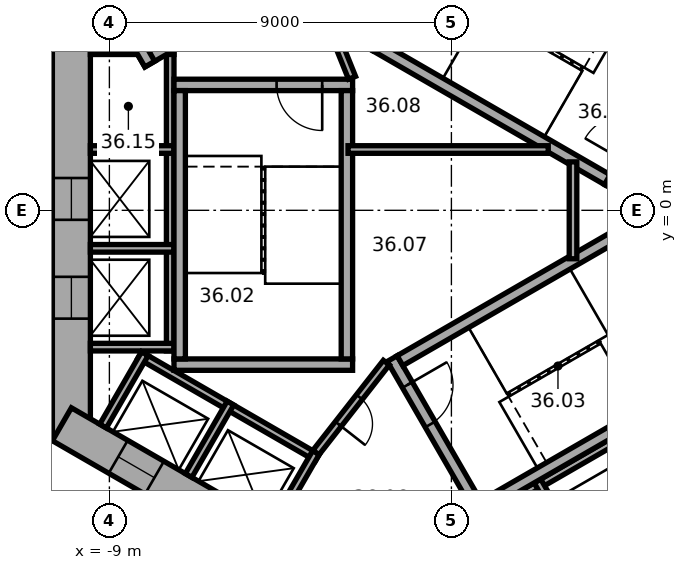
"""IFC4 building model, lengths in metres.
Left out: names, types, materials, properties, quantities, classifications, styles, units other than length and angle.
Written with IfcOpenShell. Run it as: python <this file> out.ifc"""

import sys

from ifc_helpers import new_model, si_unit, direction, frame, frame_2d, origin, place, context, subcontext, project, spatial, rectangle, extrude, element, fill, save


model = new_model("IFC4")
c1 = context("Model", 3, precision=1e-05, world=origin(), true_north=direction((0.0, 1.0)))
c2 = subcontext(c1, "Body", "Model", "MODEL_VIEW")
j1 = project(units=[si_unit("LENGTHUNIT", "METRE"), si_unit("PLANEANGLEUNIT", "RADIAN")], contexts=[c1])
p1 = place(None, origin())
s1 = spatial("IfcSite", under=j1, at=p1, CompositionType="ELEMENT")
p2 = place(p1, origin())
s2 = spatial("IfcBuilding", under=s1, at=p2, CompositionType="ELEMENT")
p3 = place(p2, frame((0.0, 0.0, 150.3)))
s3 = spatial("IfcBuildingStorey", under=s2, at=p3, CompositionType="ELEMENT", Elevation=150.3)
p4 = place(p3, frame((-10.0, 6.062, 0.0), z_axis=(0.0, 0.0, 1.0), x_axis=(0.0, -1.0, 0.0)))
e1 = element("IfcWall", 1, at=p4, inside=s3, PredefinedType="SHEAR", context=c2, shape_type="SweptSolid", body=[
    extrude(rectangle(XDim=12.125, YDim=1.0, at=frame_2d((6.062, 0.0))), origin(), (0.0, 0.0, 1.0), 3.7),
])
p5 = place(p4, frame((5.212, 0.0, 0.0)))
e2 = element("IfcOpeningElement", 2, at=p5, cuts=e1, PredefinedType="OPENING", context=c2, shape_type="SweptSolid", body=[
    extrude(rectangle(XDim=1.1, YDim=2.1, at=frame_2d((0.55, 1.05))), frame((0.0, 0.51, 0.0), z_axis=(0.0, -1.0, 0.0), x_axis=(1.0, 0.0, 0.0)), (0.0, 0.0, 1.0), 1.02),
])
p6 = place(p4, frame((7.812, 0.0, 0.0)))
e3 = element("IfcOpeningElement", 3, at=p6, cuts=e1, PredefinedType="OPENING", context=c2, shape_type="SweptSolid", body=[
    extrude(rectangle(XDim=1.1, YDim=2.1, at=frame_2d((0.55, 1.05))), frame((0.0, 0.51, 0.0), z_axis=(0.0, -1.0, 0.0), x_axis=(1.0, 0.0, 0.0)), (0.0, 0.0, 1.0), 1.02),
])
p7 = place(p3, frame((-10.25, -5.629, 0.0), z_axis=(0.0, 0.0, 1.0), x_axis=(0.866022616891, -0.50000482701, 0.0)))
e4 = element("IfcWall", 4, at=p7, inside=s3, PredefinedType="SHEAR", context=c2, shape_type="SweptSolid", body=[
    extrude(rectangle(XDim=12.125, YDim=1.0, at=frame_2d((6.062, 0.0))), origin(), (0.0, 0.0, 1.0), 3.7),
])
p8 = place(p7, frame((6.262, 0.0, 0.0)))
e5 = element("IfcOpeningElement", 5, at=p8, cuts=e4, PredefinedType="OPENING", context=c2, shape_type="SweptSolid", body=[
    extrude(rectangle(XDim=1.5, YDim=2.1, at=frame_2d((0.75, 1.05))), frame((0.0, 0.51, 0.0), z_axis=(0.0, -1.0, 0.0), x_axis=(1.0, 0.0, 0.0)), (0.0, 0.0, 1.0), 1.02),
])
p9 = place(p7, frame((1.712, 0.0, 0.0)))
e6 = element("IfcOpeningElement", 6, at=p9, cuts=e4, PredefinedType="OPENING", context=c2, shape_type="SweptSolid", body=[
    extrude(rectangle(XDim=1.1, YDim=2.1, at=frame_2d((0.55, 1.05))), frame((0.0, 0.51, 0.0), z_axis=(0.0, -1.0, 0.0), x_axis=(1.0, 0.0, 0.0)), (0.0, 0.0, 1.0), 1.02),
])
p10 = place(p7, frame((4.312, 0.0, 0.0)))
e7 = element("IfcOpeningElement", 7, at=p10, cuts=e4, PredefinedType="OPENING", context=c2, shape_type="SweptSolid", body=[
    extrude(rectangle(XDim=1.1, YDim=2.1, at=frame_2d((0.55, 1.05))), frame((0.0, 0.51, 0.0), z_axis=(0.0, -1.0, 0.0), x_axis=(1.0, 0.0, 0.0)), (0.0, 0.0, 1.0), 1.02),
])
p11 = place(p3, frame((-0.25, -11.691, 0.0), z_axis=(0.0, 0.0, 1.0), x_axis=(0.866022616891, 0.50000482701, 0.0)))
e8 = element("IfcWall", 8, at=p11, inside=s3, PredefinedType="SHEAR", context=c2, shape_type="SweptSolid", body=[
    extrude(rectangle(XDim=12.125, YDim=1.0, at=frame_2d((6.062, 0.0))), origin(), (0.0, 0.0, 1.0), 3.7),
])
p12 = place(p11, frame((2.612, 0.0, 0.0)))
e9 = element("IfcOpeningElement", 9, at=p12, cuts=e8, PredefinedType="OPENING", context=c2, shape_type="SweptSolid", body=[
    extrude(rectangle(XDim=1.1, YDim=2.1, at=frame_2d((0.55, 1.05))), frame((0.0, 0.51, 0.0), z_axis=(0.0, -1.0, 0.0), x_axis=(1.0, 0.0, 0.0)), (0.0, 0.0, 1.0), 1.02),
])
p13 = place(p11, frame((5.212, 0.0, 0.0)))
e10 = element("IfcOpeningElement", 10, at=p13, cuts=e8, PredefinedType="OPENING", context=c2, shape_type="SweptSolid", body=[
    extrude(rectangle(XDim=1.1, YDim=2.1, at=frame_2d((0.55, 1.05))), frame((0.0, 0.51, 0.0), z_axis=(0.0, -1.0, 0.0), x_axis=(1.0, 0.0, 0.0)), (0.0, 0.0, 1.0), 1.02),
])
p14 = place(p11, frame((7.812, 0.0, 0.0)))
e11 = element("IfcOpeningElement", 11, at=p14, cuts=e8, PredefinedType="OPENING", context=c2, shape_type="SweptSolid", body=[
    extrude(rectangle(XDim=1.1, YDim=2.1, at=frame_2d((0.55, 1.05))), frame((0.0, 0.51, 0.0), z_axis=(0.0, -1.0, 0.0), x_axis=(1.0, 0.0, 0.0)), (0.0, 0.0, 1.0), 1.02),
])
p15 = place(p3, frame((-7.4, 4.3, 0.0), z_axis=(0.0, 0.0, 1.0), x_axis=(0.0, -1.0, 0.0)))
e12 = element("IfcWall", 12, at=p15, inside=s3, PredefinedType="PARTITIONING", context=c2, shape_type="SweptSolid", body=[
    extrude(rectangle(XDim=8.0, YDim=0.2, at=frame_2d((4.0, 0.0))), origin(), (0.0, 0.0, 1.0), 3.42),
])
for number, where, z_axis, x_axis in (
    (13, (-7.3, 4.2, 0.0), (0.0, 0.0, 1.0), (-1.0, 0.0, 0.0)),
    (14, (-7.3, 1.6, 0.0), (0.0, 0.0, 1.0), (-1.0, 0.0, 0.0)),
    (15, (-7.3, -1.0, 0.0), (0.0, 0.0, 1.0), (-1.0, 0.0, 0.0)),
    (16, (-7.3, -3.6, 0.0), (0.0, 0.0, 1.0), (-1.0, 0.0, 0.0)),
):
    element("IfcWall", number, at=place(p3, frame(where, z_axis=z_axis, x_axis=x_axis)), inside=s3, PredefinedType="PARTITIONING", context=c2, shape_type="SweptSolid", body=[
        extrude(rectangle(XDim=2.2, YDim=0.2, at=frame_2d((1.1, 0.0))), origin(), (0.0, 0.0, 1.0), 3.42),
    ])
p16 = place(p3, frame((-8.203, -3.809, 0.0), z_axis=(0.0, 0.0, 1.0), x_axis=(0.866028230842, -0.499995103361, 0.0)))
e17 = element("IfcWall", 17, at=p16, inside=s3, PredefinedType="PARTITIONING", context=c2, shape_type="SweptSolid", body=[
    extrude(rectangle(XDim=5.4, YDim=0.2, at=frame_2d((2.7, 0.0))), origin(), (0.0, 0.0, 1.0), 3.42),
])
for number, where, z_axis, x_axis in (
    (18, (-8.067, -3.772, 0.0), (0.0, 0.0, 1.0), (-0.5, -0.866, 0.0)),
    (19, (-5.815, -5.072, 0.0), (0.0, 0.0, 1.0), (-0.5, -0.866, 0.0)),
):
    element("IfcWall", number, at=place(p3, frame(where, z_axis=z_axis, x_axis=x_axis)), inside=s3, PredefinedType="PARTITIONING", context=c2, shape_type="SweptSolid", body=[
        extrude(rectangle(XDim=2.2, YDim=0.2, at=frame_2d((1.1, 0.0))), origin(), (0.0, 0.0, 1.0), 3.42),
    ])
p17 = place(p3, frame((-3.563, -6.372, 0.0), z_axis=(0.0, 0.0, 1.0), x_axis=(-0.499994660107, -0.866028486751, 0.0)))
e20 = element("IfcWall", 20, at=p17, inside=s3, PredefinedType="PARTITIONING", context=c2, shape_type="SweptSolid", body=[
    extrude(rectangle(XDim=2.2, YDim=0.2, at=frame_2d((1.1, 0.0))), origin(), (0.0, 0.0, 1.0), 3.42),
])
p18 = place(p3, frame((-0.024, -8.559, 0.0), z_axis=(0.0, 0.0, 1.0), x_axis=(0.866026010844, 0.49999894854, 0.0)))
e21 = element("IfcWall", 21, at=p18, inside=s3, PredefinedType="PARTITIONING", context=c2, shape_type="SweptSolid", body=[
    extrude(rectangle(XDim=8.0, YDim=0.2, at=frame_2d((4.0, 0.0))), origin(), (0.0, 0.0, 1.0), 3.42),
])
p19 = place(p3, frame((2.264, -7.122, 0.0), z_axis=(0.0, 0.0, 1.0), x_axis=(0.500077893725, -0.86598042715, 0.0)))
e22 = element("IfcWall", 22, at=p19, inside=s3, PredefinedType="PARTITIONING", context=c2, shape_type="SweptSolid", body=[
    extrude(rectangle(XDim=2.2, YDim=0.2, at=frame_2d((1.1, 0.0))), origin(), (0.0, 0.0, 1.0), 3.42),
])
p20 = place(p3, frame((4.158, 0.602, 0.0), z_axis=(0.0, 0.0, 1.0), x_axis=(0.499977259774, 0.866038532462, 0.0)))
e23 = element("IfcWall", 23, at=p20, inside=s3, PredefinedType="SHEAR", context=c2, shape_type="SweptSolid", body=[
    extrude(rectangle(XDim=4.7, YDim=0.3, at=frame_2d((2.35, 0.0))), origin(), (0.0, 0.0, 1.0), 3.42),
])
p21 = place(p20, frame((0.8, 0.0, 0.0)))
e24 = element("IfcOpeningElement", 24, at=p21, cuts=e23, PredefinedType="OPENING", context=c2, shape_type="SweptSolid", body=[
    extrude(rectangle(XDim=1.2, YDim=2.1, at=frame_2d((0.6, 1.05))), frame((0.0, 0.16, 0.0), z_axis=(0.0, -1.0, 0.0), x_axis=(1.0, 0.0, 0.0)), (0.0, 0.0, 1.0), 0.32),
])
p22 = place(p3, frame((4.103, 0.807, 0.0), z_axis=(0.0, 0.0, 1.0), x_axis=(-0.866027801685, 0.499995846692, 0.0)))
e25 = element("IfcWall", 25, at=p22, inside=s3, PredefinedType="SHEAR", context=c2, shape_type="SweptSolid", body=[
    extrude(rectangle(XDim=7.06, YDim=0.3, at=frame_2d((3.53, 0.0))), origin(), (0.0, 0.0, 1.0), 3.42),
])
p23 = place(p3, frame((-2.6, 3.3, 0.0), z_axis=(0.0, 0.0, 1.0), x_axis=(-1.0, 0.0, 0.0)))
e26 = element("IfcWall", 26, at=p23, inside=s3, PredefinedType="SHEAR", context=c2, shape_type="SweptSolid", body=[
    extrude(rectangle(XDim=4.7, YDim=0.3, at=frame_2d((2.35, 0.0))), origin(), (0.0, 0.0, 1.0), 3.42),
])
p24 = place(p23, frame((0.8, 0.0, 0.0)))
e27 = element("IfcOpeningElement", 27, at=p24, cuts=e26, PredefinedType="OPENING", context=c2, shape_type="SweptSolid", body=[
    extrude(rectangle(XDim=1.2, YDim=2.1, at=frame_2d((0.6, 1.05))), frame((0.0, 0.16, 0.0), z_axis=(0.0, -1.0, 0.0), x_axis=(1.0, 0.0, 0.0)), (0.0, 0.0, 1.0), 0.32),
])
p25 = place(p3, frame((-2.6, -4.06, 0.0), z_axis=(0.0, 0.0, 1.0), x_axis=(-1.0, 0.0, 0.0)))
e28 = element("IfcWall", 28, at=p25, inside=s3, PredefinedType="SHEAR", context=c2, shape_type="SweptSolid", body=[
    extrude(rectangle(XDim=4.7, YDim=0.3, at=frame_2d((2.35, 0.0))), origin(), (0.0, 0.0, 1.0), 3.42),
])
for number, where, z_axis, x_axis in (
    (29, (-2.75, 3.15, 0.0), (0.0, 0.0, 1.0), (0.0, -1.0, 0.0)),
    (30, (-7.15, 3.15, 0.0), (0.0, 0.0, 1.0), (0.0, -1.0, 0.0)),
):
    element("IfcWall", number, at=place(p3, frame(where, z_axis=z_axis, x_axis=x_axis)), inside=s3, PredefinedType="SHEAR", context=c2, shape_type="SweptSolid", body=[
        extrude(rectangle(XDim=7.06, YDim=0.3, at=frame_2d((3.53, 0.0))), origin(), (0.0, 0.0, 1.0), 3.42),
    ])
p26 = place(p3, frame((-1.558, -3.902, 0.0), z_axis=(0.0, 0.0, 1.0), x_axis=(0.499977259774, -0.866038532462, 0.0)))
e31 = element("IfcWall", 31, at=p26, inside=s3, PredefinedType="SHEAR", context=c2, shape_type="SweptSolid", body=[
    extrude(rectangle(XDim=4.7, YDim=0.3, at=frame_2d((2.35, 0.0))), origin(), (0.0, 0.0, 1.0), 3.42),
])
p27 = place(p26, frame((0.8, 0.0, 0.0)))
e32 = element("IfcOpeningElement", 32, at=p27, cuts=e31, PredefinedType="OPENING", context=c2, shape_type="SweptSolid", body=[
    extrude(rectangle(XDim=1.2, YDim=2.1, at=frame_2d((0.6, 1.05))), frame((0.0, 0.16, 0.0), z_axis=(0.0, -1.0, 0.0), x_axis=(1.0, 0.0, 0.0)), (0.0, 0.0, 1.0), 0.32),
])
for number, where, z_axis, x_axis in (
    (33, (-1.353, -3.957, 0.0), (0.0, 0.0, 1.0), (0.866, 0.5, 0.0)),
    (34, (0.847, -7.767, 0.0), (0.0, 0.0, 1.0), (0.866, 0.5, 0.0)),
):
    element("IfcWall", number, at=place(p3, frame(where, z_axis=z_axis, x_axis=x_axis)), inside=s3, PredefinedType="SHEAR", context=c2, shape_type="SweptSolid", body=[
        extrude(rectangle(XDim=7.06, YDim=0.3, at=frame_2d((3.53, 0.0))), origin(), (0.0, 0.0, 1.0), 3.42),
    ])
p28 = place(p3, frame((-5.24, 5.577, 0.0), z_axis=(0.0, 0.0, 1.0), x_axis=(-0.866014461049, -0.500018952895, 0.0)))
e35 = element("IfcWall", 35, at=p28, inside=s3, PredefinedType="SHEAR", context=c2, shape_type="SweptSolid", body=[
    extrude(rectangle(XDim=3.35, YDim=0.3, at=frame_2d((1.675, 0.0))), origin(), (0.0, 0.0, 1.0), 3.42),
])
p29 = place(p3, frame((-7.937, 3.847, 0.0), z_axis=(0.0, 0.0, 1.0), x_axis=(-0.50002983664, 0.866008176907, 0.0)))
e36 = element("IfcWall", 36, at=p29, inside=s3, PredefinedType="SHEAR", context=c2, shape_type="SweptSolid", body=[
    extrude(rectangle(XDim=2.2, YDim=0.3, at=frame_2d((1.1, 0.0))), origin(), (0.0, 0.0, 1.0), 3.42),
])
p30 = place(p3, frame((-2.615, 3.487, 0.0), z_axis=(0.0, 0.0, 1.0), x_axis=(-0.373576831041, 0.92759924068, 0.0)))
e37 = element("IfcWall", 37, at=p30, inside=s3, PredefinedType="PARTITIONING", context=c2, shape_type="SweptSolid", body=[
    extrude(rectangle(XDim=3.002, YDim=0.2, at=frame_2d((1.501, 0.0))), origin(), (0.0, 0.0, 1.0), 3.42),
])
p31 = place(p30, frame((1.15, 0.0, 0.0)))
e38 = element("IfcOpeningElement", 38, at=p31, cuts=e37, PredefinedType="OPENING", context=c2, shape_type="SweptSolid", body=[
    extrude(rectangle(XDim=0.9, YDim=2.1, at=frame_2d((0.45, 1.05))), frame((0.0, 0.11, 0.0), z_axis=(0.0, -1.0, 0.0), x_axis=(1.0, 0.0, 0.0)), (0.0, 0.0, 1.0), 0.22),
])
p32 = place(p3, frame((-1.712, -4.008, 0.0), z_axis=(0.0, 0.0, 1.0), x_axis=(-0.616549420702, -0.787316208287, 0.0)))
e39 = element("IfcWall", 39, at=p32, inside=s3, PredefinedType="PARTITIONING", context=c2, shape_type="SweptSolid", body=[
    extrude(rectangle(XDim=3.002, YDim=0.2, at=frame_2d((1.501, 0.0))), origin(), (0.0, 0.0, 1.0), 3.42),
])
p33 = place(p32, frame((1.15, 0.0, 0.0)))
e40 = element("IfcOpeningElement", 40, at=p33, cuts=e39, PredefinedType="OPENING", context=c2, shape_type="SweptSolid", body=[
    extrude(rectangle(XDim=0.9, YDim=2.1, at=frame_2d((0.45, 1.05))), frame((0.0, 0.11, 0.0), z_axis=(0.0, -1.0, 0.0), x_axis=(1.0, 0.0, 0.0)), (0.0, 0.0, 1.0), 0.22),
])
p34 = place(p3, frame((-2.72, 1.6, 0.0), z_axis=(0.0, 0.0, 1.0), x_axis=(1.0, 0.0, 0.0)))
e41 = element("IfcWall", 41, at=p34, inside=s3, PredefinedType="PARTITIONING", context=c2, shape_type="SweptSolid", body=[
    extrude(rectangle(XDim=5.269, YDim=0.2, at=frame_2d((2.634, 0.0))), origin(), (0.0, 0.0, 1.0), 3.42),
])
p35 = place(p3, frame((3.2, -1.275, 0.0), z_axis=(0.0, 0.0, 1.0), x_axis=(0.0, 1.0, 0.0)))
e42 = element("IfcWall", 42, at=p35, inside=s3, PredefinedType="PARTITIONING", context=c2, shape_type="SweptSolid", body=[
    extrude(rectangle(XDim=2.549, YDim=0.2, at=frame_2d((1.275, 0.0))), origin(), (0.0, 0.0, 1.0), 3.42),
])
p36 = place(p24, origin())
e43 = element("IfcDoor", 43, at=p36, inside=s3, OperationType="SINGLE_SWING_RIGHT", PredefinedType="DOOR", context=c2, shape_type="SweptSolid", body=[
    extrude(rectangle(XDim=1.2, YDim=2.1, at=frame_2d((0.6, 1.05))), frame((0.0, 0.025, 0.0), z_axis=(0.0, -1.0, 0.0), x_axis=(1.0, 0.0, 0.0)), (0.0, 0.0, 1.0), 0.05),
])
fill(e27, e43)
p37 = place(p27, origin())
e44 = element("IfcDoor", 44, at=p37, inside=s3, OperationType="SINGLE_SWING_RIGHT", PredefinedType="DOOR", context=c2, shape_type="SweptSolid", body=[
    extrude(rectangle(XDim=1.2, YDim=2.1, at=frame_2d((0.6, 1.05))), frame((0.0, 0.025, 0.0), z_axis=(0.0, -1.0, 0.0), x_axis=(1.0, 0.0, 0.0)), (0.0, 0.0, 1.0), 0.05),
])
fill(e32, e44)
p38 = place(p33, origin())
e45 = element("IfcDoor", 45, at=p38, inside=s3, OperationType="SINGLE_SWING_LEFT", PredefinedType="DOOR", context=c2, shape_type="SweptSolid", body=[
    extrude(rectangle(XDim=0.9, YDim=2.1, at=frame_2d((0.45, 1.05))), frame((0.0, 0.025, 0.0), z_axis=(0.0, -1.0, 0.0), x_axis=(1.0, 0.0, 0.0)), (0.0, 0.0, 1.0), 0.05),
])
fill(e40, e45)
p39 = place(p5, origin())
e46 = element("IfcDoor", 46, at=p39, inside=s3, OperationType="DOUBLE_DOOR_SLIDING", PredefinedType="DOOR", context=c2, shape_type="SweptSolid", body=[
    extrude(rectangle(XDim=1.1, YDim=2.1, at=frame_2d((0.55, 1.05))), frame((0.0, 0.025, 0.0), z_axis=(0.0, -1.0, 0.0), x_axis=(1.0, 0.0, 0.0)), (0.0, 0.0, 1.0), 0.05),
])
fill(e2, e46)
p40 = place(p6, origin())
e47 = element("IfcDoor", 47, at=p40, inside=s3, OperationType="DOUBLE_DOOR_SLIDING", PredefinedType="DOOR", context=c2, shape_type="SweptSolid", body=[
    extrude(rectangle(XDim=1.1, YDim=2.1, at=frame_2d((0.55, 1.05))), frame((0.0, 0.025, 0.0), z_axis=(0.0, -1.0, 0.0), x_axis=(1.0, 0.0, 0.0)), (0.0, 0.0, 1.0), 0.05),
])
fill(e3, e47)
p41 = place(p9, origin())
e48 = element("IfcDoor", 48, at=p41, inside=s3, OperationType="DOUBLE_DOOR_SLIDING", PredefinedType="DOOR", context=c2, shape_type="SweptSolid", body=[
    extrude(rectangle(XDim=1.1, YDim=2.1, at=frame_2d((0.55, 1.05))), frame((0.0, 0.025, 0.0), z_axis=(0.0, -1.0, 0.0), x_axis=(1.0, 0.0, 0.0)), (0.0, 0.0, 1.0), 0.05),
])
fill(e6, e48)
save(model, sys.argv[1])
